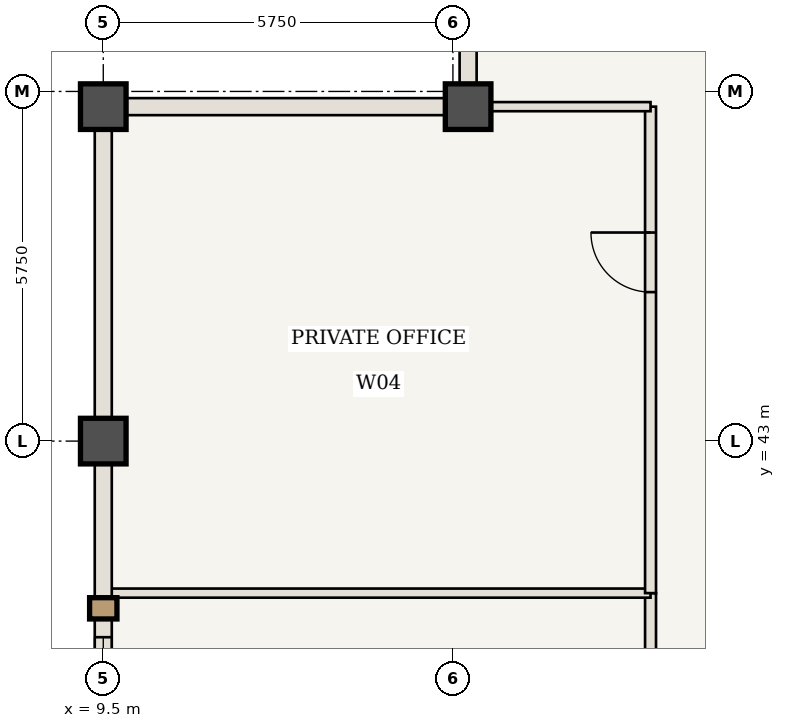
"""IFC4 building model, lengths in metres.
Left out: names, types, materials, properties, quantities, classifications, styles, units other than length and angle.
Written with IfcOpenShell. Run it as: python <this file> out.ifc"""

import sys

from ifc_helpers import new_model, si_unit, direction, frame, frame_2d, origin, origin_2d, place, context, subcontext, project, spatial, rectangle, extrude, element, fill, save


model = new_model("IFC4")
c1 = context("Model", 3, precision=1e-05, world=origin(), true_north=direction((0.0, 1.0)))
c2 = subcontext(c1, "Body", "Model", "MODEL_VIEW")
j1 = project(units=[si_unit("LENGTHUNIT", "METRE"), si_unit("PLANEANGLEUNIT", "RADIAN")], contexts=[c1])
p1 = place(None, origin())
s1 = spatial("IfcSite", under=j1, at=p1, CompositionType="ELEMENT")
p2 = place(p1, origin())
s2 = spatial("IfcBuilding", under=s1, at=p2, CompositionType="ELEMENT")
p3 = place(p2, frame((0.0, 0.0, 262.15)))
s3 = spatial("IfcBuildingStorey", under=s2, at=p3, CompositionType="ELEMENT", Elevation=262.15)
for number, where, z_axis, x_axis in (
    (1, (15.5, 48.5, 0.0), (0.0, 0.0, 1.0), (1.0, 0.0, 0.0)),
    (2, (9.5, 48.5, 0.0), (0.0, 0.0, 1.0), (1.0, 0.0, 0.0)),
    (3, (9.5, 43.0, 0.0), (0.0, 0.0, 1.0), (1.0, 0.0, 0.0)),
):
    element("IfcColumn", number, at=place(p3, frame(where, z_axis=z_axis, x_axis=x_axis)), inside=s3, PredefinedType="COLUMN", context=c2, shape_type="SweptSolid", body=[
        extrude(rectangle(XDim=0.75, YDim=0.75, at=origin_2d()), origin(), (0.0, 0.0, 1.0), 3.85),
    ])
p4 = place(p3, frame((18.5, 32.0, 0.0), z_axis=(0.0, 0.0, 1.0), x_axis=(0.0, 1.0, 0.0)))
e4 = element("IfcWall", 4, at=p4, inside=s3, PredefinedType="STANDARD", context=c2, shape_type="SweptSolid", body=[
    extrude(rectangle(XDim=8.5, YDim=0.18, at=frame_2d((4.25, 0.0))), origin(), (0.0, 0.0, 1.0), 3.43),
])
p5 = place(p4, frame((3.75, 0.0, 0.0)))
e5 = element("IfcOpeningElement", 5, at=p5, cuts=e4, PredefinedType="OPENING", context=c2, shape_type="SweptSolid", body=[
    extrude(rectangle(XDim=0.98, YDim=2.2, at=frame_2d((0.49, 1.1))), frame((0.0, 0.1, 0.0), z_axis=(0.0, -1.0, 0.0), x_axis=(1.0, 0.0, 0.0)), (0.0, 0.0, 1.0), 0.2),
])
p6 = place(p3, frame((9.56, 40.5, 0.0), z_axis=(0.0, 0.0, 1.0), x_axis=(1.0, 0.0, 0.0)))
e6 = element("IfcWall", 6, at=p6, inside=s3, PredefinedType="STANDARD", context=c2, shape_type="SweptSolid", body=[
    extrude(rectangle(XDim=8.94, YDim=0.15, at=frame_2d((4.47, 0.0))), origin(), (0.0, 0.0, 1.0), 3.43),
])
p7 = place(p3, frame((18.5, 40.5, 0.0), z_axis=(0.0, 0.0, 1.0), x_axis=(0.0, 1.0, 0.0)))
e7 = element("IfcWall", 7, at=p7, inside=s3, PredefinedType="STANDARD", context=c2, shape_type="SweptSolid", body=[
    extrude(rectangle(XDim=8.0, YDim=0.18, at=frame_2d((4.0, 0.0))), origin(), (0.0, 0.0, 1.0), 3.43),
])
p8 = place(p7, frame((4.95, 0.0, 0.0)))
e8 = element("IfcOpeningElement", 8, at=p8, cuts=e7, PredefinedType="OPENING", context=c2, shape_type="SweptSolid", body=[
    extrude(rectangle(XDim=0.98, YDim=2.2, at=frame_2d((0.49, 1.1))), frame((0.0, 0.1, 0.0), z_axis=(0.0, -1.0, 0.0), x_axis=(1.0, 0.0, 0.0)), (0.0, 0.0, 1.0), 0.2),
])
p9 = place(p3, frame((15.5, 48.5, 0.0), z_axis=(0.0, 0.0, 1.0), x_axis=(1.0, 0.0, 0.0)))
e9 = element("IfcWall", 9, at=p9, inside=s3, PredefinedType="STANDARD", context=c2, shape_type="SweptSolid", body=[
    extrude(rectangle(XDim=3.0, YDim=0.15, at=frame_2d((1.5, 0.0))), origin(), (0.0, 0.0, 1.0), 3.43),
])
p10 = place(p3, frame((9.5, 37.5, 0.0), z_axis=(0.0, 0.0, 1.0), x_axis=(0.0, 1.0, 0.0)))
e10 = element("IfcWall", 10, at=p10, inside=s3, PredefinedType="USERDEFINED", context=c2, shape_type="SweptSolid", body=[
    extrude(rectangle(XDim=5.5, YDim=0.28, at=frame_2d((2.75, 0.0))), origin(), (0.0, 0.0, 1.0), 2.73),
])
p11 = place(p10, frame((0.675, 0.0, 0.85)))
e11 = element("IfcOpeningElement", 11, at=p11, cuts=e10, PredefinedType="OPENING", context=c2, shape_type="SweptSolid", body=[
    extrude(rectangle(XDim=1.6, YDim=1.68, at=frame_2d((0.8, 0.84))), frame((0.0, 0.15, 0.0), z_axis=(0.0, -1.0, 0.0), x_axis=(1.0, 0.0, 0.0)), (0.0, 0.0, 1.0), 0.3),
])
p12 = place(p3, frame((9.5, 43.0, 0.0), z_axis=(0.0, 0.0, 1.0), x_axis=(0.0, 1.0, 0.0)))
e12 = element("IfcWall", 12, at=p12, inside=s3, PredefinedType="USERDEFINED", context=c2, shape_type="SweptSolid", body=[
    extrude(rectangle(XDim=5.5, YDim=0.28, at=frame_2d((2.75, 0.0))), origin(), (0.0, 0.0, 1.0), 2.73),
])
for number, where, z_axis, x_axis in (
    (13, (15.5, 48.5, 0.0), (0.0, 0.0, 1.0), (0.0, 1.0, 0.0)),
    (14, (9.5, 48.5, 0.0), (0.0, 0.0, 1.0), (1.0, 0.0, 0.0)),
):
    element("IfcWall", number, at=place(p3, frame(where, z_axis=z_axis, x_axis=x_axis)), inside=s3, PredefinedType="USERDEFINED", context=c2, shape_type="SweptSolid", body=[
        extrude(rectangle(XDim=6.0, YDim=0.28, at=frame_2d((3.0, 0.0))), origin(), (0.0, 0.0, 1.0), 2.73),
    ])
p13 = place(p8, origin())
e15 = element("IfcDoor", 15, at=p13, inside=s3, OperationType="SINGLE_SWING_RIGHT", PredefinedType="DOOR", context=c2, shape_type="SweptSolid", body=[
    extrude(rectangle(XDim=0.98, YDim=2.2, at=frame_2d((0.49, 1.1))), frame((0.0, 0.025, 0.0), z_axis=(0.0, -1.0, 0.0), x_axis=(1.0, 0.0, 0.0)), (0.0, 0.0, 1.0), 0.05),
])
fill(e8, e15)
p14 = place(p11, origin())
e16 = element("IfcWindow", 16, at=p14, inside=s3, PartitioningType="SINGLE_PANEL", PredefinedType="WINDOW", context=c2, shape_type="SweptSolid", body=[
    extrude(rectangle(XDim=1.6, YDim=1.68, at=frame_2d((0.8, 0.84))), frame((0.0, 0.03, 0.0), z_axis=(0.0, -1.0, 0.0), x_axis=(1.0, 0.0, 0.0)), (0.0, 0.0, 1.0), 0.06),
])
fill(e11, e16)
save(model, sys.argv[1])
